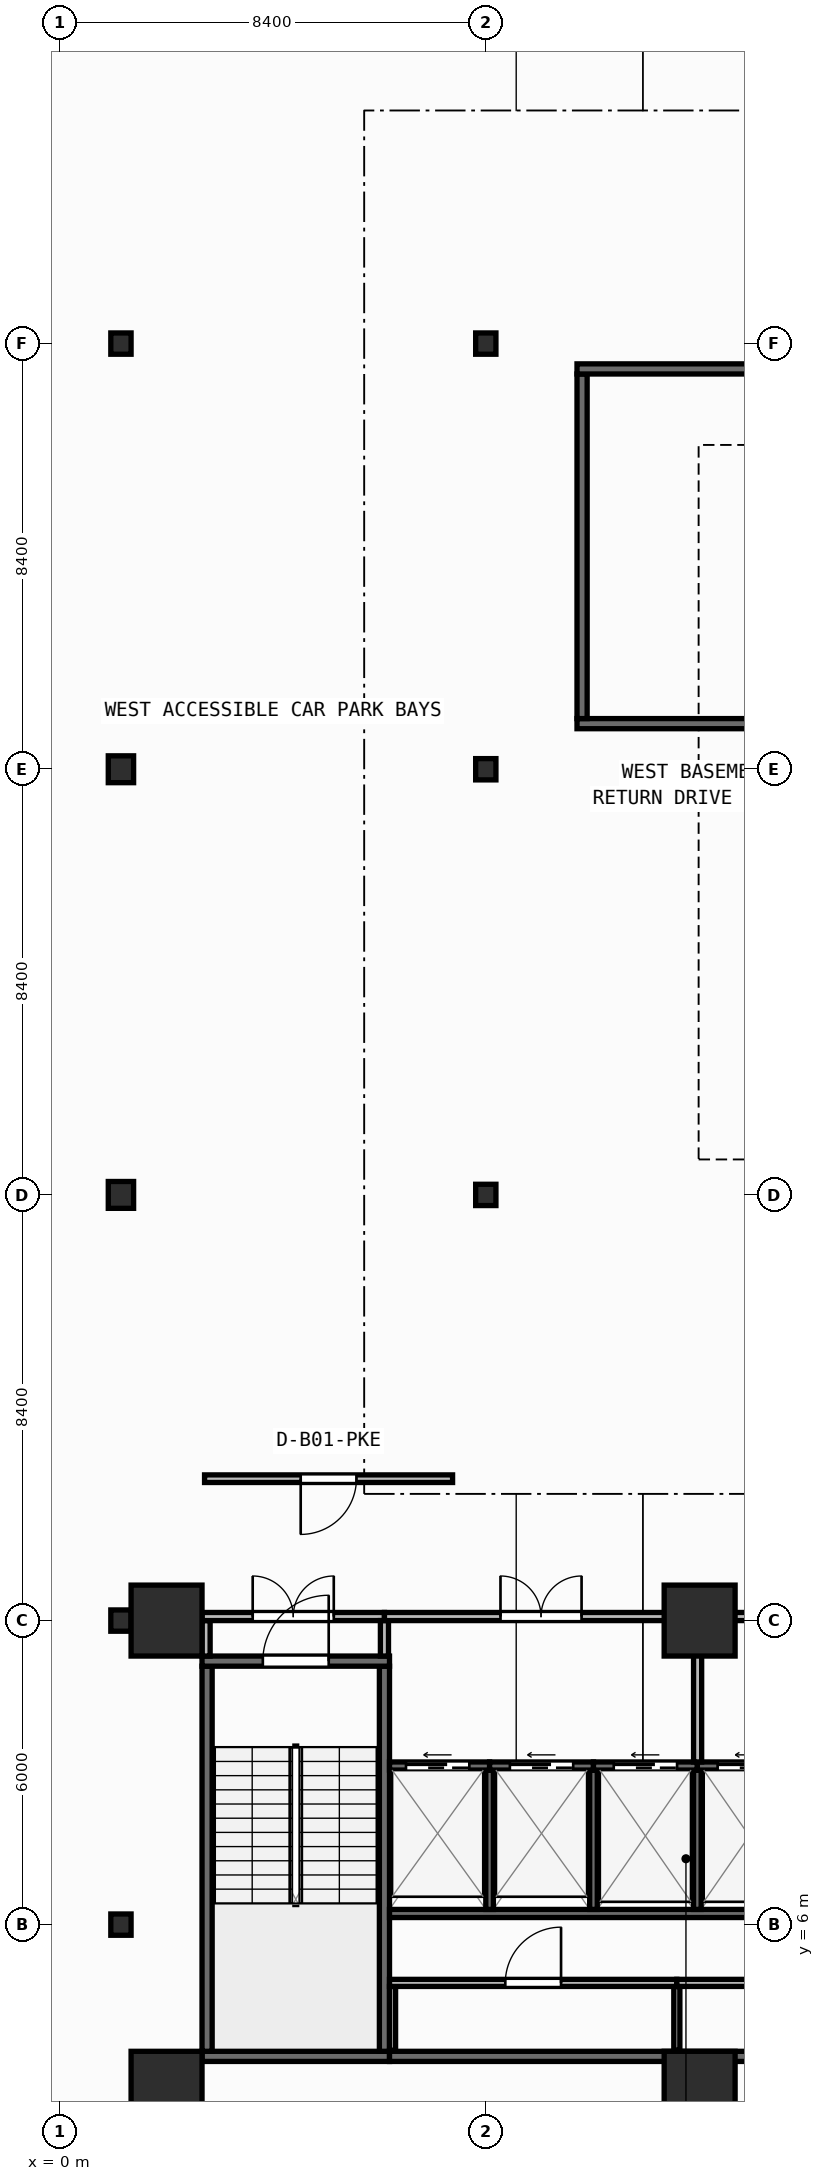
"""IFC4 building model, lengths in metres.
Left out: names, types, materials, properties, quantities, classifications, styles, units other than length and angle.
Written with IfcOpenShell. Run it as: python <this file> out.ifc"""

import sys

from ifc_helpers import new_model, si_unit, direction, frame, frame_2d, origin, origin_2d, place, context, subcontext, project, spatial, rectangle, i_section, extrude, element, fill, save


model = new_model("IFC4")
c1 = context("Model", 3, precision=1e-05, world=origin(), true_north=direction((0.0, 1.0)))
c2 = subcontext(c1, "Body", "Model", "MODEL_VIEW")
j1 = project(units=[si_unit("LENGTHUNIT", "METRE"), si_unit("PLANEANGLEUNIT", "RADIAN")], contexts=[c1])
p1 = place(None, origin())
s1 = spatial("IfcSite", under=j1, at=p1, CompositionType="ELEMENT")
p2 = place(p1, origin())
s2 = spatial("IfcBuilding", under=s1, at=p2, CompositionType="ELEMENT")
p3 = place(p2, frame((0.0, 0.0, -4.5)))
s3 = spatial("IfcBuildingStorey", under=s2, at=p3, CompositionType="ELEMENT", Elevation=-4.5)
for number, where, z_axis, x_axis in (
    (1, (2.1, 2.8, 0.0), (0.0, 0.0, 1.0), (1.0, 0.0, 0.0)),
    (2, (12.62, 2.8, 0.0), (0.0, 0.0, 1.0), (1.0, 0.0, 0.0)),
):
    element("IfcColumn", number, at=place(p3, frame(where, z_axis=z_axis, x_axis=x_axis)), inside=s3, PredefinedType="COLUMN", context=c2, shape_type="SweptSolid", body=[
        extrude(rectangle(XDim=1.4, YDim=1.4, at=origin_2d()), origin(), (0.0, 0.0, 1.0), 4.5),
    ])
for number, where, z_axis, x_axis in (
    (3, (1.2, 6.0, 0.0), (0.0, 0.0, 1.0), (1.0, 0.0, 0.0)),
    (4, (1.2, 12.0, 0.0), (0.0, 0.0, 1.0), (1.0, 0.0, 0.0)),
):
    element("IfcColumn", number, at=place(p3, frame(where, z_axis=z_axis, x_axis=x_axis)), inside=s3, PredefinedType="COLUMN", context=c2, shape_type="SweptSolid", body=[
        extrude(i_section(OverallWidth=0.4, OverallDepth=0.42, WebThickness=0.025, FlangeThickness=0.04, at=origin_2d()), origin(), (0.0, 0.0, 1.0), 4.5),
    ])
for number, where, z_axis, x_axis in (
    (5, (2.1, 12.0, 0.0), (0.0, 0.0, 1.0), (1.0, 0.0, 0.0)),
    (6, (12.62, 12.0, 0.0), (0.0, 0.0, 1.0), (1.0, 0.0, 0.0)),
):
    element("IfcColumn", number, at=place(p3, frame(where, z_axis=z_axis, x_axis=x_axis)), inside=s3, PredefinedType="COLUMN", context=c2, shape_type="SweptSolid", body=[
        extrude(rectangle(XDim=1.4, YDim=1.4, at=origin_2d()), origin(), (0.0, 0.0, 1.0), 4.5),
    ])
p4 = place(p3, frame((1.2, 20.4, 0.0), z_axis=(0.0, 0.0, 1.0), x_axis=(1.0, 0.0, 0.0)))
e7 = element("IfcColumn", 7, at=p4, inside=s3, PredefinedType="COLUMN", context=c2, shape_type="SweptSolid", body=[
    extrude(i_section(OverallWidth=0.5, OverallDepth=0.53, WebThickness=0.028, FlangeThickness=0.045, at=origin_2d()), origin(), (0.0, 0.0, 1.0), 4.5),
])
p5 = place(p3, frame((8.4, 20.4, 0.0), z_axis=(0.0, 0.0, 1.0), x_axis=(1.0, 0.0, 0.0)))
e8 = element("IfcColumn", 8, at=p5, inside=s3, PredefinedType="COLUMN", context=c2, shape_type="SweptSolid", body=[
    extrude(i_section(OverallWidth=0.4, OverallDepth=0.42, WebThickness=0.025, FlangeThickness=0.04, at=origin_2d()), origin(), (0.0, 0.0, 1.0), 4.5),
])
p6 = place(p3, frame((1.2, 28.8, 0.0), z_axis=(0.0, 0.0, 1.0), x_axis=(1.0, 0.0, 0.0)))
e9 = element("IfcColumn", 9, at=p6, inside=s3, PredefinedType="COLUMN", context=c2, shape_type="SweptSolid", body=[
    extrude(i_section(OverallWidth=0.5, OverallDepth=0.53, WebThickness=0.028, FlangeThickness=0.045, at=origin_2d()), origin(), (0.0, 0.0, 1.0), 4.5),
])
for number, where, z_axis, x_axis in (
    (10, (8.4, 28.8, 0.0), (0.0, 0.0, 1.0), (1.0, 0.0, 0.0)),
    (11, (1.2, 37.2, 0.0), (0.0, 0.0, 1.0), (1.0, 0.0, 0.0)),
    (12, (8.4, 37.2, 0.0), (0.0, 0.0, 1.0), (1.0, 0.0, 0.0)),
):
    element("IfcColumn", number, at=place(p3, frame(where, z_axis=z_axis, x_axis=x_axis)), inside=s3, PredefinedType="COLUMN", context=c2, shape_type="SweptSolid", body=[
        extrude(i_section(OverallWidth=0.4, OverallDepth=0.42, WebThickness=0.025, FlangeThickness=0.04, at=origin_2d()), origin(), (0.0, 0.0, 1.0), 4.5),
    ])
p7 = place(p3, frame((2.8, 3.4, 0.0), z_axis=(0.0, 0.0, 1.0), x_axis=(1.0, 0.0, 0.0)))
e13 = element("IfcWall", 13, at=p7, inside=s3, PredefinedType="SHEAR", context=c2, shape_type="SweptSolid", body=[
    extrude(rectangle(XDim=3.7, YDim=0.2, at=frame_2d((1.85, 0.0))), origin(), (0.0, 0.0, 1.0), 4.25),
])
for number, where, z_axis, x_axis in (
    (14, (2.9, 3.5, 0.0), (0.0, 0.0, 1.0), (0.0, 1.0, 0.0)),
    (15, (6.4, 3.5, 0.0), (0.0, 0.0, 1.0), (0.0, 1.0, 0.0)),
):
    element("IfcWall", number, at=place(p3, frame(where, z_axis=z_axis, x_axis=x_axis)), inside=s3, PredefinedType="SHEAR", context=c2, shape_type="SweptSolid", body=[
        extrude(rectangle(XDim=7.6, YDim=0.2, at=frame_2d((3.8, 0.0))), origin(), (0.0, 0.0, 1.0), 4.25),
    ])
p8 = place(p3, frame((2.8, 11.2, 0.0), z_axis=(0.0, 0.0, 1.0), x_axis=(1.0, 0.0, 0.0)))
e16 = element("IfcWall", 16, at=p8, inside=s3, PredefinedType="SHEAR", context=c2, shape_type="SweptSolid", body=[
    extrude(rectangle(XDim=3.7, YDim=0.2, at=frame_2d((1.85, 0.0))), origin(), (0.0, 0.0, 1.0), 4.25),
])
p9 = place(p8, frame((1.2, 0.0, 0.0)))
e17 = element("IfcOpeningElement", 17, at=p9, cuts=e16, PredefinedType="OPENING", context=c2, shape_type="SweptSolid", body=[
    extrude(rectangle(XDim=1.3, YDim=2.15, at=frame_2d((0.65, 1.075))), frame((0.0, 0.11, 0.0), z_axis=(0.0, -1.0, 0.0), x_axis=(1.0, 0.0, 0.0)), (0.0, 0.0, 1.0), 0.22),
])
p10 = place(p3, frame((6.5, 3.4, 0.0), z_axis=(0.0, 0.0, 1.0), x_axis=(1.0, 0.0, 0.0)))
e18 = element("IfcWall", 18, at=p10, inside=s3, PredefinedType="SHEAR", context=c2, shape_type="SweptSolid", body=[
    extrude(rectangle(XDim=13.7, YDim=0.2, at=frame_2d((6.85, 0.0))), origin(), (0.0, 0.0, 1.0), 4.25),
])
p11 = place(p3, frame((10.2, 29.7, 0.0), z_axis=(0.0, 0.0, 1.0), x_axis=(1.0, 0.0, 0.0)))
e19 = element("IfcWall", 19, at=p11, inside=s3, PredefinedType="SHEAR", context=c2, shape_type="SweptSolid", body=[
    extrude(rectangle(XDim=3.74, YDim=0.2, at=frame_2d((1.87, 0.0))), origin(), (0.0, 0.0, 1.0), 4.25),
])
p12 = place(p3, frame((10.3, 29.8, 0.0), z_axis=(0.0, 0.0, 1.0), x_axis=(0.0, 1.0, 0.0)))
e20 = element("IfcWall", 20, at=p12, inside=s3, PredefinedType="SHEAR", context=c2, shape_type="SweptSolid", body=[
    extrude(rectangle(XDim=6.8, YDim=0.2, at=frame_2d((3.4, 0.0))), origin(), (0.0, 0.0, 1.0), 4.25),
])
p13 = place(p3, frame((10.2, 36.7, 0.0), z_axis=(0.0, 0.0, 1.0), x_axis=(1.0, 0.0, 0.0)))
e21 = element("IfcWall", 21, at=p13, inside=s3, PredefinedType="SHEAR", context=c2, shape_type="SweptSolid", body=[
    extrude(rectangle(XDim=3.74, YDim=0.2, at=frame_2d((1.87, 0.0))), origin(), (0.0, 0.0, 1.0), 4.25),
])
p14 = place(p3, frame((6.5, 6.22, 0.0), z_axis=(0.0, 0.0, 1.0), x_axis=(1.0, 0.0, 0.0)))
e22 = element("IfcWall", 22, at=p14, inside=s3, PredefinedType="SHEAR", context=c2, shape_type="SweptSolid", body=[
    extrude(rectangle(XDim=12.11, YDim=0.16, at=frame_2d((6.055, 0.0))), origin(), (0.0, 0.0, 1.0), 4.25),
])
for number, where, z_axis, x_axis in (
    (23, (8.475, 6.3, 0.0), (0.0, 0.0, 1.0), (0.0, 1.0, 0.0)),
    (24, (10.525, 6.3, 0.0), (0.0, 0.0, 1.0), (0.0, 1.0, 0.0)),
    (25, (12.575, 6.3, 0.0), (0.0, 0.0, 1.0), (0.0, 1.0, 0.0)),
):
    element("IfcWall", number, at=place(p3, frame(where, z_axis=z_axis, x_axis=x_axis)), inside=s3, PredefinedType="SHEAR", context=c2, shape_type="SweptSolid", body=[
        extrude(rectangle(XDim=2.75, YDim=0.15, at=frame_2d((1.375, 0.0))), origin(), (0.0, 0.0, 1.0), 4.25),
    ])
p15 = place(p3, frame((6.5, 9.13, 0.0), z_axis=(0.0, 0.0, 1.0), x_axis=(1.0, 0.0, 0.0)))
e26 = element("IfcWall", 26, at=p15, inside=s3, PredefinedType="SHEAR", context=c2, shape_type="SweptSolid", body=[
    extrude(rectangle(XDim=1.975, YDim=0.16, at=frame_2d((0.988, 0.0))), origin(), (0.0, 0.0, 1.0), 4.25),
])
p16 = place(p15, frame((0.325, 0.0, 0.0)))
e27 = element("IfcOpeningElement", 27, at=p16, cuts=e26, PredefinedType="OPENING", context=c2, shape_type="SweptSolid", body=[
    extrude(rectangle(XDim=1.25, YDim=2.15, at=frame_2d((0.625, 1.075))), frame((0.0, 0.09, 0.0), z_axis=(0.0, -1.0, 0.0), x_axis=(1.0, 0.0, 0.0)), (0.0, 0.0, 1.0), 0.18),
])
p17 = place(p3, frame((8.475, 9.13, 0.0), z_axis=(0.0, 0.0, 1.0), x_axis=(1.0, 0.0, 0.0)))
e28 = element("IfcWall", 28, at=p17, inside=s3, PredefinedType="SHEAR", context=c2, shape_type="SweptSolid", body=[
    extrude(rectangle(XDim=2.05, YDim=0.16, at=frame_2d((1.025, 0.0))), origin(), (0.0, 0.0, 1.0), 4.25),
])
p18 = place(p17, frame((0.4, 0.0, 0.0)))
e29 = element("IfcOpeningElement", 29, at=p18, cuts=e28, PredefinedType="OPENING", context=c2, shape_type="SweptSolid", body=[
    extrude(rectangle(XDim=1.25, YDim=2.15, at=frame_2d((0.625, 1.075))), frame((0.0, 0.09, 0.0), z_axis=(0.0, -1.0, 0.0), x_axis=(1.0, 0.0, 0.0)), (0.0, 0.0, 1.0), 0.18),
])
p19 = place(p3, frame((10.525, 9.13, 0.0), z_axis=(0.0, 0.0, 1.0), x_axis=(1.0, 0.0, 0.0)))
e30 = element("IfcWall", 30, at=p19, inside=s3, PredefinedType="SHEAR", context=c2, shape_type="SweptSolid", body=[
    extrude(rectangle(XDim=2.05, YDim=0.16, at=frame_2d((1.025, 0.0))), origin(), (0.0, 0.0, 1.0), 4.25),
])
p20 = place(p19, frame((0.4, 0.0, 0.0)))
e31 = element("IfcOpeningElement", 31, at=p20, cuts=e30, PredefinedType="OPENING", context=c2, shape_type="SweptSolid", body=[
    extrude(rectangle(XDim=1.25, YDim=2.15, at=frame_2d((0.625, 1.075))), frame((0.0, 0.09, 0.0), z_axis=(0.0, -1.0, 0.0), x_axis=(1.0, 0.0, 0.0)), (0.0, 0.0, 1.0), 0.18),
])
p21 = place(p3, frame((12.575, 9.13, 0.0), z_axis=(0.0, 0.0, 1.0), x_axis=(1.0, 0.0, 0.0)))
e32 = element("IfcWall", 32, at=p21, inside=s3, PredefinedType="SHEAR", context=c2, shape_type="SweptSolid", body=[
    extrude(rectangle(XDim=2.05, YDim=0.16, at=frame_2d((1.025, 0.0))), origin(), (0.0, 0.0, 1.0), 4.25),
])
p22 = place(p21, frame((0.4, 0.0, 0.0)))
e33 = element("IfcOpeningElement", 33, at=p22, cuts=e32, PredefinedType="OPENING", context=c2, shape_type="SweptSolid", body=[
    extrude(rectangle(XDim=1.25, YDim=2.15, at=frame_2d((0.625, 1.075))), frame((0.0, 0.09, 0.0), z_axis=(0.0, -1.0, 0.0), x_axis=(1.0, 0.0, 0.0)), (0.0, 0.0, 1.0), 0.18),
])
for number, where, z_axis, x_axis in (
    (34, (6.56, 3.52, 0.0), (0.0, 0.0, 1.0), (0.0, 1.0, 0.0)),
    (35, (12.17, 3.52, 0.0), (0.0, 0.0, 1.0), (0.0, 1.0, 0.0)),
):
    element("IfcWall", number, at=place(p3, frame(where, z_axis=z_axis, x_axis=x_axis)), inside=s3, PredefinedType="PARTITIONING", context=c2, shape_type="SweptSolid", body=[
        extrude(rectangle(XDim=1.26, YDim=0.12, at=frame_2d((0.63, 0.0))), origin(), (0.0, 0.0, 1.0), 4.25),
    ])
p23 = place(p3, frame((6.5, 4.85, 0.0), z_axis=(0.0, 0.0, 1.0), x_axis=(1.0, 0.0, 0.0)))
e36 = element("IfcWall", 36, at=p23, inside=s3, PredefinedType="PARTITIONING", context=c2, shape_type="SweptSolid", body=[
    extrude(rectangle(XDim=5.67, YDim=0.14, at=frame_2d((2.835, 0.0))), origin(), (0.0, 0.0, 1.0), 4.25),
])
p24 = place(p23, frame((2.285, 0.0, 0.0)))
e37 = element("IfcOpeningElement", 37, at=p24, cuts=e36, PredefinedType="OPENING", context=c2, shape_type="SweptSolid", body=[
    extrude(rectangle(XDim=1.1, YDim=2.1, at=frame_2d((0.55, 1.05))), frame((0.0, 0.08, 0.0), z_axis=(0.0, -1.0, 0.0), x_axis=(1.0, 0.0, 0.0)), (0.0, 0.0, 1.0), 0.16),
])
p25 = place(p3, frame((12.17, 4.85, 0.0), z_axis=(0.0, 0.0, 1.0), x_axis=(1.0, 0.0, 0.0)))
e38 = element("IfcWall", 38, at=p25, inside=s3, PredefinedType="PARTITIONING", context=c2, shape_type="SweptSolid", body=[
    extrude(rectangle(XDim=6.43, YDim=0.14, at=frame_2d((3.215, 0.0))), origin(), (0.0, 0.0, 1.0), 4.25),
])
p26 = place(p25, frame((2.725, 0.0, 0.0)))
e39 = element("IfcOpeningElement", 39, at=p26, cuts=e38, PredefinedType="OPENING", context=c2, shape_type="SweptSolid", body=[
    extrude(rectangle(XDim=0.98, YDim=2.1, at=frame_2d((0.49, 1.05))), frame((0.0, 0.08, 0.0), z_axis=(0.0, -1.0, 0.0), x_axis=(1.0, 0.0, 0.0)), (0.0, 0.0, 1.0), 0.16),
])
p27 = place(p3, frame((2.88, 11.3, 0.0), z_axis=(0.0, 0.0, 1.0), x_axis=(0.0, 1.0, 0.0)))
e40 = element("IfcWall", 40, at=p27, inside=s3, PredefinedType="PARTITIONING", context=c2, shape_type="SweptSolid", body=[
    extrude(rectangle(XDim=0.7, YDim=0.16, at=frame_2d((0.35, 0.0))), origin(), (0.0, 0.0, 1.0), 4.25),
])
p28 = place(p3, frame((2.8, 12.08, 0.0), z_axis=(0.0, 0.0, 1.0), x_axis=(1.0, 0.0, 0.0)))
e41 = element("IfcWall", 41, at=p28, inside=s3, PredefinedType="PARTITIONING", context=c2, shape_type="SweptSolid", body=[
    extrude(rectangle(XDim=3.6, YDim=0.16, at=frame_2d((1.8, 0.0))), origin(), (0.0, 0.0, 1.0), 3.315),
])
p29 = place(p28, frame((1.0, 0.0, 0.0)))
e42 = element("IfcOpeningElement", 42, at=p29, cuts=e41, PredefinedType="OPENING", context=c2, shape_type="SweptSolid", body=[
    extrude(rectangle(XDim=1.6, YDim=2.05, at=frame_2d((0.8, 1.025))), frame((0.0, 0.09, 0.0), z_axis=(0.0, -1.0, 0.0), x_axis=(1.0, 0.0, 0.0)), (0.0, 0.0, 1.0), 0.18),
])
p30 = place(p3, frame((6.4, 11.3, 0.0), z_axis=(0.0, 0.0, 1.0), x_axis=(0.0, 1.0, 0.0)))
e43 = element("IfcWall", 43, at=p30, inside=s3, PredefinedType="PARTITIONING", context=c2, shape_type="SweptSolid", body=[
    extrude(rectangle(XDim=0.7, YDim=0.16, at=frame_2d((0.35, 0.0))), origin(), (0.0, 0.0, 1.0), 4.25),
])
p31 = place(p3, frame((6.4, 12.08, 0.0), z_axis=(0.0, 0.0, 1.0), x_axis=(1.0, 0.0, 0.0)))
e44 = element("IfcWall", 44, at=p31, inside=s3, PredefinedType="PARTITIONING", context=c2, shape_type="SweptSolid", body=[
    extrude(rectangle(XDim=6.18, YDim=0.16, at=frame_2d((3.09, 0.0))), origin(), (0.0, 0.0, 1.0), 3.315),
])
p32 = place(p31, frame((2.29, 0.0, 0.0)))
e45 = element("IfcOpeningElement", 45, at=p32, cuts=e44, PredefinedType="OPENING", context=c2, shape_type="SweptSolid", body=[
    extrude(rectangle(XDim=1.6, YDim=2.05, at=frame_2d((0.8, 1.025))), frame((0.0, 0.09, 0.0), z_axis=(0.0, -1.0, 0.0), x_axis=(1.0, 0.0, 0.0)), (0.0, 0.0, 1.0), 0.18),
])
p33 = place(p3, frame((12.58, 9.21, 0.0), z_axis=(0.0, 0.0, 1.0), x_axis=(0.0, 1.0, 0.0)))
e46 = element("IfcWall", 46, at=p33, inside=s3, PredefinedType="PARTITIONING", context=c2, shape_type="SweptSolid", body=[
    extrude(rectangle(XDim=2.79, YDim=0.16, at=frame_2d((1.395, 0.0))), origin(), (0.0, 0.0, 1.0), 4.25),
])
p34 = place(p3, frame((12.58, 12.08, 0.0), z_axis=(0.0, 0.0, 1.0), x_axis=(1.0, 0.0, 0.0)))
e47 = element("IfcWall", 47, at=p34, inside=s3, PredefinedType="PARTITIONING", context=c2, shape_type="SweptSolid", body=[
    extrude(rectangle(XDim=7.7, YDim=0.16, at=frame_2d((3.85, 0.0))), origin(), (0.0, 0.0, 1.0), 3.315),
])
p35 = place(p34, frame((3.05, 0.0, 0.0)))
e48 = element("IfcOpeningElement", 48, at=p35, cuts=e47, PredefinedType="OPENING", context=c2, shape_type="SweptSolid", body=[
    extrude(rectangle(XDim=1.6, YDim=2.05, at=frame_2d((0.8, 1.025))), frame((0.0, 0.09, 0.0), z_axis=(0.0, -1.0, 0.0), x_axis=(1.0, 0.0, 0.0)), (0.0, 0.0, 1.0), 0.18),
])
p36 = place(p3, frame((7.745, 14.8, 0.0), z_axis=(0.0, 0.0, 1.0), x_axis=(-1.0, 0.0, 0.0)))
e49 = element("IfcWall", 49, at=p36, inside=s3, PredefinedType="PARTITIONING", context=c2, shape_type="SweptSolid", body=[
    extrude(rectangle(XDim=4.895, YDim=0.15, at=frame_2d((2.447, 0.0))), origin(), (0.0, 0.0, 1.0), 4.25),
])
p37 = place(p36, frame((1.897, 0.0, 0.0)))
e50 = element("IfcOpeningElement", 50, at=p37, cuts=e49, PredefinedType="OPENING", context=c2, shape_type="SweptSolid", body=[
    extrude(rectangle(XDim=1.1, YDim=2.1, at=frame_2d((0.55, 1.05))), frame((0.0, 0.085, 0.0), z_axis=(0.0, -1.0, 0.0), x_axis=(1.0, 0.0, 0.0)), (0.0, 0.0, 1.0), 0.17),
])
p38 = place(p9, origin())
e51 = element("IfcDoor", 51, at=p38, inside=s3, OperationType="SINGLE_SWING_RIGHT", PredefinedType="DOOR", context=c2, shape_type="SweptSolid", body=[
    extrude(rectangle(XDim=1.3, YDim=2.15, at=frame_2d((0.65, 1.075))), frame((0.0, 0.025, 0.0), z_axis=(0.0, -1.0, 0.0), x_axis=(1.0, 0.0, 0.0)), (0.0, 0.0, 1.0), 0.05),
])
fill(e17, e51)
p39 = place(p16, origin())
e52 = element("IfcDoor", 52, at=p39, inside=s3, OperationType="SLIDING_TO_LEFT", PredefinedType="DOOR", context=c2, shape_type="SweptSolid", body=[
    extrude(rectangle(XDim=1.25, YDim=2.15, at=frame_2d((0.625, 1.075))), frame((0.0, 0.025, 0.0), z_axis=(0.0, -1.0, 0.0), x_axis=(1.0, 0.0, 0.0)), (0.0, 0.0, 1.0), 0.05),
])
fill(e27, e52)
p40 = place(p18, origin())
e53 = element("IfcDoor", 53, at=p40, inside=s3, OperationType="SLIDING_TO_LEFT", PredefinedType="DOOR", context=c2, shape_type="SweptSolid", body=[
    extrude(rectangle(XDim=1.25, YDim=2.15, at=frame_2d((0.625, 1.075))), frame((0.0, 0.025, 0.0), z_axis=(0.0, -1.0, 0.0), x_axis=(1.0, 0.0, 0.0)), (0.0, 0.0, 1.0), 0.05),
])
fill(e29, e53)
p41 = place(p20, origin())
e54 = element("IfcDoor", 54, at=p41, inside=s3, OperationType="SLIDING_TO_LEFT", PredefinedType="DOOR", context=c2, shape_type="SweptSolid", body=[
    extrude(rectangle(XDim=1.25, YDim=2.15, at=frame_2d((0.625, 1.075))), frame((0.0, 0.025, 0.0), z_axis=(0.0, -1.0, 0.0), x_axis=(1.0, 0.0, 0.0)), (0.0, 0.0, 1.0), 0.05),
])
fill(e31, e54)
p42 = place(p22, origin())
e55 = element("IfcDoor", 55, at=p42, inside=s3, OperationType="SLIDING_TO_LEFT", PredefinedType="DOOR", context=c2, shape_type="SweptSolid", body=[
    extrude(rectangle(XDim=1.25, YDim=2.15, at=frame_2d((0.625, 1.075))), frame((0.0, 0.025, 0.0), z_axis=(0.0, -1.0, 0.0), x_axis=(1.0, 0.0, 0.0)), (0.0, 0.0, 1.0), 0.05),
])
fill(e33, e55)
p43 = place(p24, origin())
e56 = element("IfcDoor", 56, at=p43, inside=s3, OperationType="SINGLE_SWING_RIGHT", PredefinedType="DOOR", context=c2, shape_type="SweptSolid", body=[
    extrude(rectangle(XDim=1.1, YDim=2.1, at=frame_2d((0.55, 1.05))), frame((0.0, 0.025, 0.0), z_axis=(0.0, -1.0, 0.0), x_axis=(1.0, 0.0, 0.0)), (0.0, 0.0, 1.0), 0.05),
])
fill(e37, e56)
p44 = place(p29, origin())
e57 = element("IfcDoor", 57, at=p44, inside=s3, OperationType="DOUBLE_DOOR_SINGLE_SWING", PredefinedType="DOOR", context=c2, shape_type="SweptSolid", body=[
    extrude(rectangle(XDim=1.6, YDim=2.05, at=frame_2d((0.8, 1.025))), frame((0.0, 0.025, 0.0), z_axis=(0.0, -1.0, 0.0), x_axis=(1.0, 0.0, 0.0)), (0.0, 0.0, 1.0), 0.05),
])
fill(e42, e57)
p45 = place(p32, origin())
e58 = element("IfcDoor", 58, at=p45, inside=s3, OperationType="DOUBLE_DOOR_SINGLE_SWING", PredefinedType="DOOR", context=c2, shape_type="SweptSolid", body=[
    extrude(rectangle(XDim=1.6, YDim=2.05, at=frame_2d((0.8, 1.025))), frame((0.0, 0.025, 0.0), z_axis=(0.0, -1.0, 0.0), x_axis=(1.0, 0.0, 0.0)), (0.0, 0.0, 1.0), 0.05),
])
fill(e45, e58)
p46 = place(p37, origin())
e59 = element("IfcDoor", 59, at=p46, inside=s3, OperationType="SINGLE_SWING_RIGHT", PredefinedType="DOOR", context=c2, shape_type="SweptSolid", body=[
    extrude(rectangle(XDim=1.1, YDim=2.1, at=frame_2d((0.55, 1.05))), frame((0.0, 0.025, 0.0), z_axis=(0.0, -1.0, 0.0), x_axis=(1.0, 0.0, 0.0)), (0.0, 0.0, 1.0), 0.05),
])
fill(e50, e59)
save(model, sys.argv[1])
